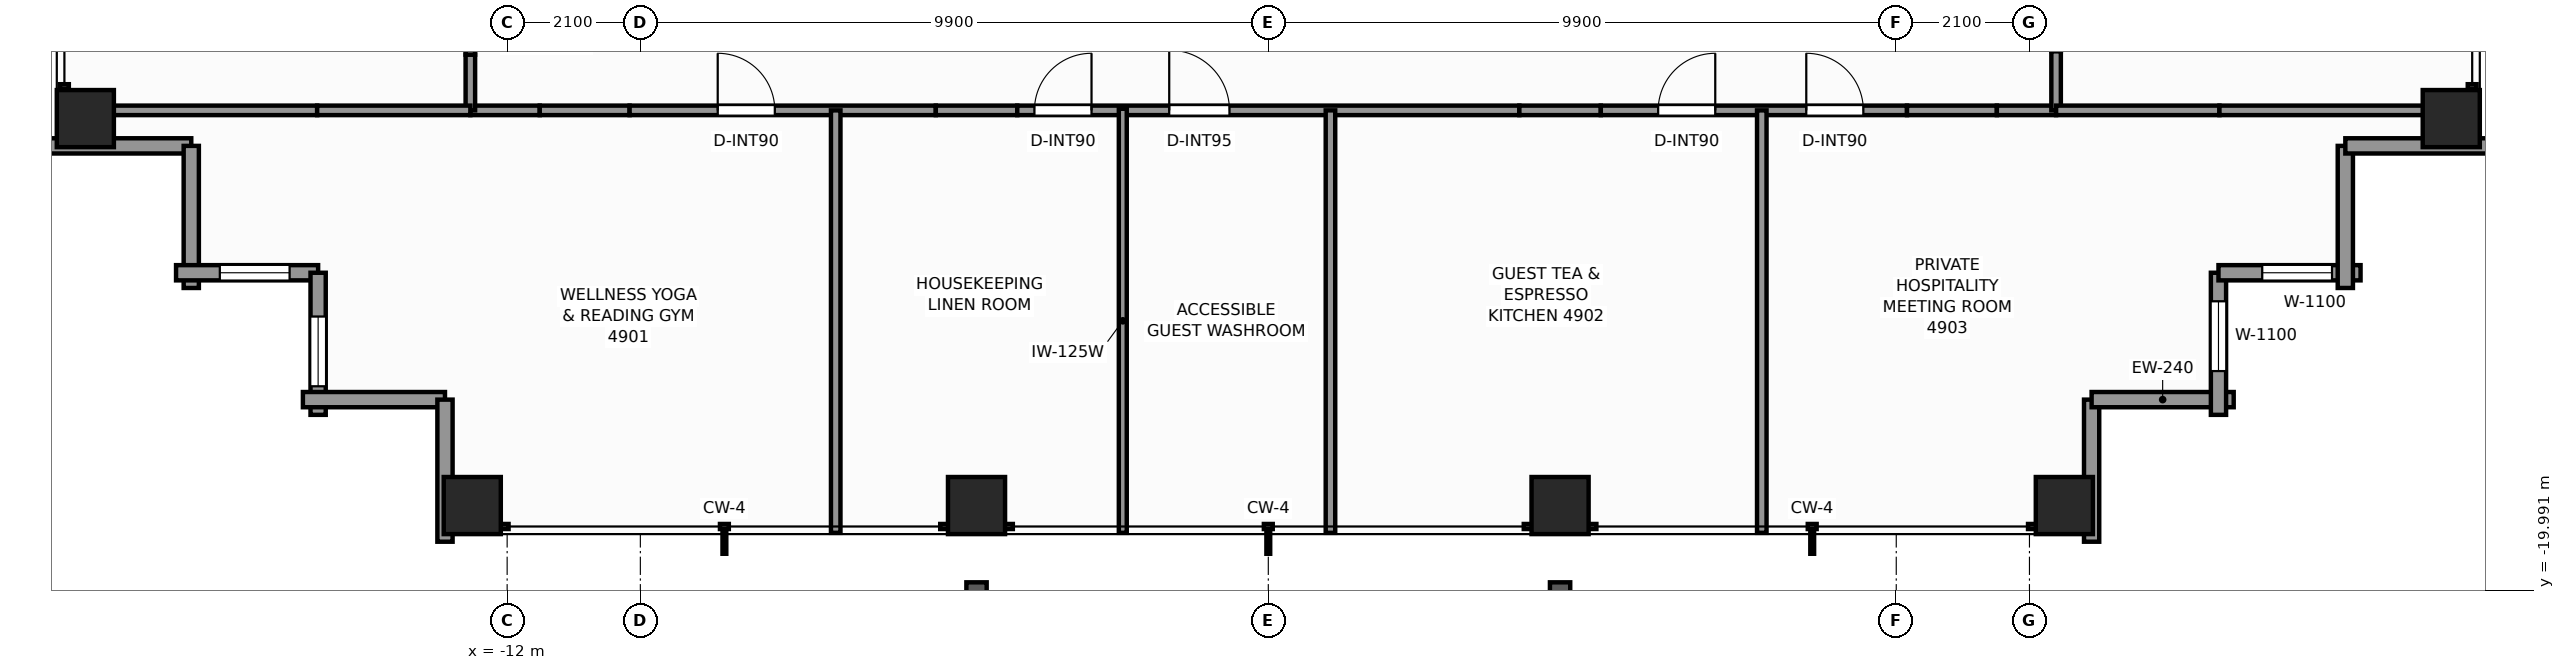
"""IFC4 building model, lengths in metres.
Left out: names, types, materials, properties, quantities, classifications, styles, units other than length and angle.
Written with IfcOpenShell. Run it as: python <this file> out.ifc"""

import sys

from ifc_helpers import new_model, si_unit, direction, frame, frame_2d, origin, origin_2d, place, context, subcontext, project, spatial, rectangle, extrude, element, fill, save


model = new_model("IFC4")
c1 = context("Model", 3, precision=1e-05, world=origin(), true_north=direction((0.0, 1.0)))
c2 = subcontext(c1, "Body", "Model", "MODEL_VIEW")
j1 = project(units=[si_unit("LENGTHUNIT", "METRE"), si_unit("PLANEANGLEUNIT", "RADIAN")], contexts=[c1])
p1 = place(None, origin())
s1 = spatial("IfcSite", under=j1, at=p1, CompositionType="ELEMENT")
p2 = place(p1, origin())
s2 = spatial("IfcBuilding", under=s1, at=p2, CompositionType="ELEMENT")
p3 = place(p2, frame((0.0, 0.0, 170.1)))
s3 = spatial("IfcBuildingStorey", under=s2, at=p3, CompositionType="ELEMENT", Elevation=170.1)
for number, where, z_axis, x_axis in (
    (1, (-12.55, -18.65, 0.0), (0.0, 0.0, 1.0), (1.0, 0.0, 0.0)),
    (2, (-4.6, -18.65, 0.0), (0.0, 0.0, 1.0), (1.0, 0.0, 0.0)),
    (3, (4.6, -18.65, 0.0), (0.0, 0.0, 1.0), (1.0, 0.0, 0.0)),
    (4, (12.55, -18.65, 0.0), (0.0, 0.0, 1.0), (1.0, 0.0, 0.0)),
    (5, (-18.65, -12.55, 0.0), (0.0, 0.0, 1.0), (1.0, 0.0, 0.0)),
    (6, (18.65, -12.55, 0.0), (0.0, 0.0, 1.0), (1.0, 0.0, 0.0)),
):
    element("IfcColumn", number, at=place(p3, frame(where, z_axis=z_axis, x_axis=x_axis)), inside=s3, PredefinedType="COLUMN", context=c2, shape_type="SweptSolid", body=[
        extrude(rectangle(XDim=0.9, YDim=0.9, at=origin_2d()), origin(), (0.0, 0.0, 1.0), 3.3),
    ])
for number, where, z_axis, x_axis in (
    (7, (12.98, -16.98, 0.0), (0.0, 0.0, 1.0), (0.0, -1.0, 0.0)),
    (8, (15.22, -16.98, 0.0), (0.0, 0.0, 1.0), (-1.0, 0.0, 0.0)),
):
    element("IfcWall", number, at=place(p3, frame(where, z_axis=z_axis, x_axis=x_axis)), inside=s3, PredefinedType="STANDARD", context=c2, shape_type="SweptSolid", body=[
        extrude(rectangle(XDim=2.24, YDim=0.24, at=frame_2d((1.12, 0.0))), origin(), (0.0, 0.0, 1.0), 1.275),
    ])
p4 = place(p3, frame((14.98, -14.98, 0.0), z_axis=(0.0, 0.0, 1.0), x_axis=(0.0, -1.0, 0.0)))
e9 = element("IfcWall", 9, at=p4, inside=s3, PredefinedType="STANDARD", context=c2, shape_type="SweptSolid", body=[
    extrude(rectangle(XDim=2.24, YDim=0.24, at=frame_2d((1.12, 0.0))), origin(), (0.0, 0.0, 1.0), 2.463),
])
p5 = place(p4, frame((0.45, 0.0, 0.65)))
e10 = element("IfcOpeningElement", 10, at=p5, cuts=e9, PredefinedType="OPENING", context=c2, shape_type="SweptSolid", body=[
    extrude(rectangle(XDim=1.1, YDim=1.45, at=frame_2d((0.55, 0.725))), frame((0.0, 0.13, 0.0), z_axis=(0.0, -1.0, 0.0), x_axis=(1.0, 0.0, 0.0)), (0.0, 0.0, 1.0), 0.26),
])
p6 = place(p3, frame((17.22, -14.98, 0.0), z_axis=(0.0, 0.0, 1.0), x_axis=(-1.0, 0.0, 0.0)))
e11 = element("IfcWall", 11, at=p6, inside=s3, PredefinedType="STANDARD", context=c2, shape_type="SweptSolid", body=[
    extrude(rectangle(XDim=2.24, YDim=0.24, at=frame_2d((1.12, 0.0))), origin(), (0.0, 0.0, 1.0), 2.463),
])
p7 = place(p6, frame((0.45, 0.0, 0.65)))
e12 = element("IfcOpeningElement", 12, at=p7, cuts=e11, PredefinedType="OPENING", context=c2, shape_type="SweptSolid", body=[
    extrude(rectangle(XDim=1.1, YDim=1.45, at=frame_2d((0.55, 0.725))), frame((0.0, 0.13, 0.0), z_axis=(0.0, -1.0, 0.0), x_axis=(1.0, 0.0, 0.0)), (0.0, 0.0, 1.0), 0.26),
])
for number, where, z_axis, x_axis in (
    (13, (16.98, -12.98, 0.0), (0.0, 0.0, 1.0), (0.0, -1.0, 0.0)),
    (14, (19.22, -12.98, 0.0), (0.0, 0.0, 1.0), (-1.0, 0.0, 0.0)),
    (15, (-16.98, -12.98, 0.0), (0.0, 0.0, 1.0), (-1.0, 0.0, 0.0)),
    (16, (-16.98, -15.22, 0.0), (0.0, 0.0, 1.0), (0.0, 1.0, 0.0)),
):
    element("IfcWall", number, at=place(p3, frame(where, z_axis=z_axis, x_axis=x_axis)), inside=s3, PredefinedType="STANDARD", context=c2, shape_type="SweptSolid", body=[
        extrude(rectangle(XDim=2.24, YDim=0.24, at=frame_2d((1.12, 0.0))), origin(), (0.0, 0.0, 1.0), 1.275),
    ])
p8 = place(p3, frame((-14.98, -14.98, 0.0), z_axis=(0.0, 0.0, 1.0), x_axis=(-1.0, 0.0, 0.0)))
e17 = element("IfcWall", 17, at=p8, inside=s3, PredefinedType="STANDARD", context=c2, shape_type="SweptSolid", body=[
    extrude(rectangle(XDim=2.24, YDim=0.24, at=frame_2d((1.12, 0.0))), origin(), (0.0, 0.0, 1.0), 2.463),
])
p9 = place(p8, frame((0.45, 0.0, 0.65)))
e18 = element("IfcOpeningElement", 18, at=p9, cuts=e17, PredefinedType="OPENING", context=c2, shape_type="SweptSolid", body=[
    extrude(rectangle(XDim=1.1, YDim=1.45, at=frame_2d((0.55, 0.725))), frame((0.0, 0.13, 0.0), z_axis=(0.0, -1.0, 0.0), x_axis=(1.0, 0.0, 0.0)), (0.0, 0.0, 1.0), 0.26),
])
p10 = place(p3, frame((-14.98, -17.22, 0.0), z_axis=(0.0, 0.0, 1.0), x_axis=(0.0, 1.0, 0.0)))
e19 = element("IfcWall", 19, at=p10, inside=s3, PredefinedType="STANDARD", context=c2, shape_type="SweptSolid", body=[
    extrude(rectangle(XDim=2.24, YDim=0.24, at=frame_2d((1.12, 0.0))), origin(), (0.0, 0.0, 1.0), 2.463),
])
p11 = place(p10, frame((0.45, 0.0, 0.65)))
e20 = element("IfcOpeningElement", 20, at=p11, cuts=e19, PredefinedType="OPENING", context=c2, shape_type="SweptSolid", body=[
    extrude(rectangle(XDim=1.1, YDim=1.45, at=frame_2d((0.55, 0.725))), frame((0.0, 0.13, 0.0), z_axis=(0.0, -1.0, 0.0), x_axis=(1.0, 0.0, 0.0)), (0.0, 0.0, 1.0), 0.26),
])
for number, where, z_axis, x_axis in (
    (21, (-12.98, -16.98, 0.0), (0.0, 0.0, 1.0), (-1.0, 0.0, 0.0)),
    (22, (-12.98, -19.22, 0.0), (0.0, 0.0, 1.0), (0.0, 1.0, 0.0)),
):
    element("IfcWall", number, at=place(p3, frame(where, z_axis=z_axis, x_axis=x_axis)), inside=s3, PredefinedType="STANDARD", context=c2, shape_type="SweptSolid", body=[
        extrude(rectangle(XDim=2.24, YDim=0.24, at=frame_2d((1.12, 0.0))), origin(), (0.0, 0.0, 1.0), 1.275),
    ])
p12 = place(p3, frame((-12.58, -12.42, 0.0), z_axis=(0.0, 0.0, 1.0), x_axis=(1.0, 0.0, 0.0)))
e23 = element("IfcWall", 23, at=p12, inside=s3, PredefinedType="PARTITIONING", context=c2, shape_type="SweptSolid", body=[
    extrude(rectangle(XDim=1.094, YDim=0.15, at=frame_2d((0.547, 0.0))), origin(), (0.0, 0.0, 1.0), 3.08),
])
p13 = place(p3, frame((-11.486, -12.42, 0.0), z_axis=(0.0, 0.0, 1.0), x_axis=(1.0, 0.0, 0.0)))
e24 = element("IfcWall", 24, at=p13, inside=s3, PredefinedType="PARTITIONING", context=c2, shape_type="SweptSolid", body=[
    extrude(rectangle(XDim=1.417, YDim=0.15, at=frame_2d((0.708, 0.0))), origin(), (0.0, 0.0, 1.0), 1.265),
])
p14 = place(p3, frame((-10.069, -12.42, 0.0), z_axis=(0.0, 0.0, 1.0), x_axis=(1.0, 0.0, 0.0)))
e25 = element("IfcWall", 25, at=p14, inside=s3, PredefinedType="PARTITIONING", context=c2, shape_type="SweptSolid", body=[
    extrude(rectangle(XDim=4.827, YDim=0.15, at=frame_2d((2.414, 0.0))), origin(), (0.0, 0.0, 1.0), 3.08),
])
p15 = place(p14, frame((1.389, 0.0, 0.0)))
e26 = element("IfcOpeningElement", 26, at=p15, cuts=e25, PredefinedType="OPENING", context=c2, shape_type="SweptSolid", body=[
    extrude(rectangle(XDim=0.9, YDim=2.06, at=frame_2d((0.45, 1.03))), frame((0.0, 0.085, 0.0), z_axis=(0.0, -1.0, 0.0), x_axis=(1.0, 0.0, 0.0)), (0.0, 0.0, 1.0), 0.17),
])
p16 = place(p3, frame((-5.242, -12.42, 0.0), z_axis=(0.0, 0.0, 1.0), x_axis=(1.0, 0.0, 0.0)))
e27 = element("IfcWall", 27, at=p16, inside=s3, PredefinedType="PARTITIONING", context=c2, shape_type="SweptSolid", body=[
    extrude(rectangle(XDim=1.284, YDim=0.15, at=frame_2d((0.642, 0.0))), origin(), (0.0, 0.0, 1.0), 1.265),
])
p17 = place(p3, frame((-3.958, -12.42, 0.0), z_axis=(0.0, 0.0, 1.0), x_axis=(1.0, 0.0, 0.0)))
e28 = element("IfcWall", 28, at=p17, inside=s3, PredefinedType="PARTITIONING", context=c2, shape_type="SweptSolid", body=[
    extrude(rectangle(XDim=7.916, YDim=0.15, at=frame_2d((3.958, 0.0))), origin(), (0.0, 0.0, 1.0), 2.369),
])
p18 = place(p17, frame((0.271, 0.0, 0.0)))
e29 = element("IfcOpeningElement", 29, at=p18, cuts=e28, PredefinedType="OPENING", context=c2, shape_type="SweptSolid", body=[
    extrude(rectangle(XDim=0.9, YDim=2.06, at=frame_2d((0.45, 1.03))), frame((0.0, 0.085, 0.0), z_axis=(0.0, -1.0, 0.0), x_axis=(1.0, 0.0, 0.0)), (0.0, 0.0, 1.0), 0.17),
])
p19 = place(p17, frame((2.396, 0.0, 0.0)))
e30 = element("IfcOpeningElement", 30, at=p19, cuts=e28, PredefinedType="OPENING", context=c2, shape_type="SweptSolid", body=[
    extrude(rectangle(XDim=0.95, YDim=2.06, at=frame_2d((0.475, 1.03))), frame((0.0, 0.085, 0.0), z_axis=(0.0, -1.0, 0.0), x_axis=(1.0, 0.0, 0.0)), (0.0, 0.0, 1.0), 0.17),
])
p20 = place(p3, frame((3.958, -12.42, 0.0), z_axis=(0.0, 0.0, 1.0), x_axis=(1.0, 0.0, 0.0)))
e31 = element("IfcWall", 31, at=p20, inside=s3, PredefinedType="PARTITIONING", context=c2, shape_type="SweptSolid", body=[
    extrude(rectangle(XDim=1.284, YDim=0.15, at=frame_2d((0.642, 0.0))), origin(), (0.0, 0.0, 1.0), 1.265),
])
p21 = place(p3, frame((5.242, -12.42, 0.0), z_axis=(0.0, 0.0, 1.0), x_axis=(1.0, 0.0, 0.0)))
e32 = element("IfcWall", 32, at=p21, inside=s3, PredefinedType="PARTITIONING", context=c2, shape_type="SweptSolid", body=[
    extrude(rectangle(XDim=4.827, YDim=0.15, at=frame_2d((2.414, 0.0))), origin(), (0.0, 0.0, 1.0), 3.08),
])
p22 = place(p21, frame((0.905, 0.0, 0.0)))
e33 = element("IfcOpeningElement", 33, at=p22, cuts=e32, PredefinedType="OPENING", context=c2, shape_type="SweptSolid", body=[
    extrude(rectangle(XDim=0.9, YDim=2.06, at=frame_2d((0.45, 1.03))), frame((0.0, 0.085, 0.0), z_axis=(0.0, -1.0, 0.0), x_axis=(1.0, 0.0, 0.0)), (0.0, 0.0, 1.0), 0.17),
])
p23 = place(p21, frame((3.24, 0.0, 0.0)))
e34 = element("IfcOpeningElement", 34, at=p23, cuts=e32, PredefinedType="OPENING", context=c2, shape_type="SweptSolid", body=[
    extrude(rectangle(XDim=0.9, YDim=2.06, at=frame_2d((0.45, 1.03))), frame((0.0, 0.085, 0.0), z_axis=(0.0, -1.0, 0.0), x_axis=(1.0, 0.0, 0.0)), (0.0, 0.0, 1.0), 0.17),
])
p24 = place(p3, frame((10.069, -12.42, 0.0), z_axis=(0.0, 0.0, 1.0), x_axis=(1.0, 0.0, 0.0)))
e35 = element("IfcWall", 35, at=p24, inside=s3, PredefinedType="PARTITIONING", context=c2, shape_type="SweptSolid", body=[
    extrude(rectangle(XDim=1.417, YDim=0.15, at=frame_2d((0.708, 0.0))), origin(), (0.0, 0.0, 1.0), 1.265),
])
p25 = place(p3, frame((11.486, -12.42, 0.0), z_axis=(0.0, 0.0, 1.0), x_axis=(1.0, 0.0, 0.0)))
e36 = element("IfcWall", 36, at=p25, inside=s3, PredefinedType="PARTITIONING", context=c2, shape_type="SweptSolid", body=[
    extrude(rectangle(XDim=0.934, YDim=0.15, at=frame_2d((0.467, 0.0))), origin(), (0.0, 0.0, 1.0), 3.08),
])
p26 = place(p3, frame((-12.58, -12.42, 0.0), z_axis=(0.0, 0.0, 1.0), x_axis=(0.0, 1.0, 0.0)))
e37 = element("IfcWall", 37, at=p26, inside=s3, PredefinedType="PARTITIONING", context=c2, shape_type="SweptSolid", body=[
    extrude(rectangle(XDim=0.878, YDim=0.15, at=frame_2d((0.439, 0.0))), origin(), (0.0, 0.0, 1.0), 3.08),
])
p27 = place(p3, frame((-12.58, -11.542, 0.0), z_axis=(0.0, 0.0, 1.0), x_axis=(0.0, 1.0, 0.0)))
e38 = element("IfcWall", 38, at=p27, inside=s3, PredefinedType="PARTITIONING", context=c2, shape_type="SweptSolid", body=[
    extrude(rectangle(XDim=1.417, YDim=0.15, at=frame_2d((0.708, 0.0))), origin(), (0.0, 0.0, 1.0), 1.265),
])
p28 = place(p3, frame((12.42, -12.42, 0.0), z_axis=(0.0, 0.0, 1.0), x_axis=(0.0, 1.0, 0.0)))
e39 = element("IfcWall", 39, at=p28, inside=s3, PredefinedType="PARTITIONING", context=c2, shape_type="SweptSolid", body=[
    extrude(rectangle(XDim=0.934, YDim=0.15, at=frame_2d((0.467, 0.0))), origin(), (0.0, 0.0, 1.0), 3.08),
])
p29 = place(p3, frame((-19.08, -12.42, 0.0), z_axis=(0.0, 0.0, 1.0), x_axis=(1.0, 0.0, 0.0)))
e40 = element("IfcWall", 40, at=p29, inside=s3, PredefinedType="PARTITIONING", context=c2, shape_type="SweptSolid", body=[
    extrude(rectangle(XDim=4.085, YDim=0.15, at=frame_2d((2.042, 0.0))), origin(), (0.0, 0.0, 1.0), 1.265),
])
p30 = place(p3, frame((-14.995, -12.42, 0.0), z_axis=(0.0, 0.0, 1.0), x_axis=(1.0, 0.0, 0.0)))
e41 = element("IfcWall", 41, at=p30, inside=s3, PredefinedType="PARTITIONING", context=c2, shape_type="SweptSolid", body=[
    extrude(rectangle(XDim=2.415, YDim=0.15, at=frame_2d((1.208, 0.0))), origin(), (0.0, 0.0, 1.0), 3.08),
])
p31 = place(p3, frame((12.42, -12.42, 0.0), z_axis=(0.0, 0.0, 1.0), x_axis=(1.0, 0.0, 0.0)))
e42 = element("IfcWall", 42, at=p31, inside=s3, PredefinedType="PARTITIONING", context=c2, shape_type="SweptSolid", body=[
    extrude(rectangle(XDim=2.575, YDim=0.15, at=frame_2d((1.288, 0.0))), origin(), (0.0, 0.0, 1.0), 3.08),
])
p32 = place(p3, frame((14.995, -12.42, 0.0), z_axis=(0.0, 0.0, 1.0), x_axis=(1.0, 0.0, 0.0)))
e43 = element("IfcWall", 43, at=p32, inside=s3, PredefinedType="PARTITIONING", context=c2, shape_type="SweptSolid", body=[
    extrude(rectangle(XDim=4.085, YDim=0.15, at=frame_2d((2.042, 0.0))), origin(), (0.0, 0.0, 1.0), 1.265),
])
p33 = place(p3, frame((-6.82, -19.08, 0.0), z_axis=(0.0, 0.0, 1.0), x_axis=(0.0, 1.0, 0.0)))
e44 = element("IfcWall", 44, at=p33, inside=s3, PredefinedType="PARTITIONING", context=c2, shape_type="SweptSolid", body=[
    extrude(rectangle(XDim=6.66, YDim=0.15, at=frame_2d((3.33, 0.0))), origin(), (0.0, 0.0, 1.0), 2.453),
])
p34 = place(p3, frame((0.98, -19.08, 0.0), z_axis=(0.0, 0.0, 1.0), x_axis=(0.0, 1.0, 0.0)))
e45 = element("IfcWall", 45, at=p34, inside=s3, PredefinedType="PARTITIONING", context=c2, shape_type="SweptSolid", body=[
    extrude(rectangle(XDim=6.66, YDim=0.15, at=frame_2d((3.33, 0.0))), origin(), (0.0, 0.0, 1.0), 3.08),
])
p35 = place(p3, frame((-2.294, -19.08, 0.0), z_axis=(0.0, 0.0, 1.0), x_axis=(0.0, 1.0, 0.0)))
e46 = element("IfcWall", 46, at=p35, inside=s3, PredefinedType="PARTITIONING", context=c2, shape_type="SweptSolid", body=[
    extrude(rectangle(XDim=6.685, YDim=0.125, at=frame_2d((3.343, 0.0))), origin(), (0.0, 0.0, 1.0), 3.08),
])
p36 = place(p3, frame((7.78, -19.08, 0.0), z_axis=(0.0, 0.0, 1.0), x_axis=(0.0, 1.0, 0.0)))
e47 = element("IfcWall", 47, at=p36, inside=s3, PredefinedType="PARTITIONING", context=c2, shape_type="SweptSolid", body=[
    extrude(rectangle(XDim=6.66, YDim=0.15, at=frame_2d((3.33, 0.0))), origin(), (0.0, 0.0, 1.0), 2.453),
])
p37 = place(p5, origin())
e48 = element("IfcWindow", 48, at=p37, inside=s3, PartitioningType="SINGLE_PANEL", PredefinedType="WINDOW", context=c2, shape_type="SweptSolid", body=[
    extrude(rectangle(XDim=1.1, YDim=1.45, at=frame_2d((0.55, 0.725))), frame((0.0, 0.03, 0.0), z_axis=(0.0, -1.0, 0.0), x_axis=(1.0, 0.0, 0.0)), (0.0, 0.0, 1.0), 0.06),
])
fill(e10, e48)
p38 = place(p7, origin())
e49 = element("IfcWindow", 49, at=p38, inside=s3, PartitioningType="SINGLE_PANEL", PredefinedType="WINDOW", context=c2, shape_type="SweptSolid", body=[
    extrude(rectangle(XDim=1.1, YDim=1.45, at=frame_2d((0.55, 0.725))), frame((0.0, 0.03, 0.0), z_axis=(0.0, -1.0, 0.0), x_axis=(1.0, 0.0, 0.0)), (0.0, 0.0, 1.0), 0.06),
])
fill(e12, e49)
p39 = place(p9, origin())
e50 = element("IfcWindow", 50, at=p39, inside=s3, PartitioningType="SINGLE_PANEL", PredefinedType="WINDOW", context=c2, shape_type="SweptSolid", body=[
    extrude(rectangle(XDim=1.1, YDim=1.45, at=frame_2d((0.55, 0.725))), frame((0.0, 0.03, 0.0), z_axis=(0.0, -1.0, 0.0), x_axis=(1.0, 0.0, 0.0)), (0.0, 0.0, 1.0), 0.06),
])
fill(e18, e50)
p40 = place(p11, origin())
e51 = element("IfcWindow", 51, at=p40, inside=s3, PartitioningType="SINGLE_PANEL", PredefinedType="WINDOW", context=c2, shape_type="SweptSolid", body=[
    extrude(rectangle(XDim=1.1, YDim=1.45, at=frame_2d((0.55, 0.725))), frame((0.0, 0.03, 0.0), z_axis=(0.0, -1.0, 0.0), x_axis=(1.0, 0.0, 0.0)), (0.0, 0.0, 1.0), 0.06),
])
fill(e20, e51)
p41 = place(p15, origin())
e52 = element("IfcDoor", 52, at=p41, inside=s3, OperationType="SINGLE_SWING_LEFT", PredefinedType="DOOR", context=c2, shape_type="SweptSolid", body=[
    extrude(rectangle(XDim=0.9, YDim=2.06, at=frame_2d((0.45, 1.03))), frame((0.0, 0.025, 0.0), z_axis=(0.0, -1.0, 0.0), x_axis=(1.0, 0.0, 0.0)), (0.0, 0.0, 1.0), 0.05),
])
fill(e26, e52)
p42 = place(p18, origin())
e53 = element("IfcDoor", 53, at=p42, inside=s3, OperationType="SINGLE_SWING_RIGHT", PredefinedType="DOOR", context=c2, shape_type="SweptSolid", body=[
    extrude(rectangle(XDim=0.9, YDim=2.06, at=frame_2d((0.45, 1.03))), frame((0.0, 0.025, 0.0), z_axis=(0.0, -1.0, 0.0), x_axis=(1.0, 0.0, 0.0)), (0.0, 0.0, 1.0), 0.05),
])
fill(e29, e53)
p43 = place(p19, origin())
e54 = element("IfcDoor", 54, at=p43, inside=s3, OperationType="SINGLE_SWING_LEFT", PredefinedType="DOOR", context=c2, shape_type="SweptSolid", body=[
    extrude(rectangle(XDim=0.95, YDim=2.06, at=frame_2d((0.475, 1.03))), frame((0.0, 0.025, 0.0), z_axis=(0.0, -1.0, 0.0), x_axis=(1.0, 0.0, 0.0)), (0.0, 0.0, 1.0), 0.05),
])
fill(e30, e54)
p44 = place(p22, origin())
e55 = element("IfcDoor", 55, at=p44, inside=s3, OperationType="SINGLE_SWING_RIGHT", PredefinedType="DOOR", context=c2, shape_type="SweptSolid", body=[
    extrude(rectangle(XDim=0.9, YDim=2.06, at=frame_2d((0.45, 1.03))), frame((0.0, 0.025, 0.0), z_axis=(0.0, -1.0, 0.0), x_axis=(1.0, 0.0, 0.0)), (0.0, 0.0, 1.0), 0.05),
])
fill(e33, e55)
p45 = place(p23, origin())
e56 = element("IfcDoor", 56, at=p45, inside=s3, OperationType="SINGLE_SWING_LEFT", PredefinedType="DOOR", context=c2, shape_type="SweptSolid", body=[
    extrude(rectangle(XDim=0.9, YDim=2.06, at=frame_2d((0.45, 1.03))), frame((0.0, 0.025, 0.0), z_axis=(0.0, -1.0, 0.0), x_axis=(1.0, 0.0, 0.0)), (0.0, 0.0, 1.0), 0.05),
])
fill(e34, e56)
save(model, sys.argv[1])
